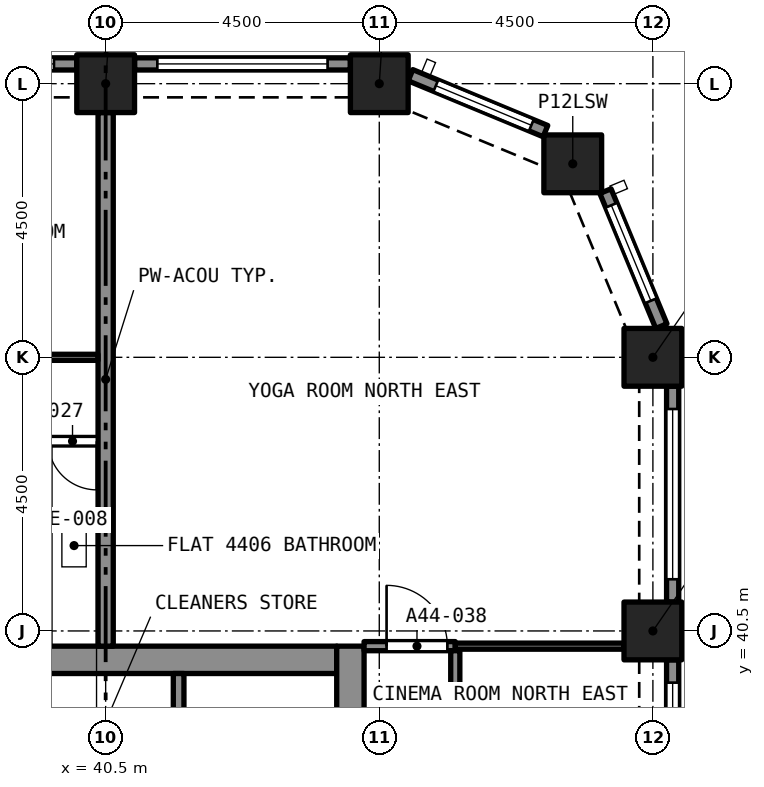
"""IFC4 building model, lengths in metres.
Left out: names, types, materials, properties, quantities, classifications, styles, units other than length and angle.
Written with IfcOpenShell. Run it as: python <this file> out.ifc"""

import sys

from ifc_helpers import new_model, si_unit, direction, frame, frame_2d, origin, origin_2d, place, context, subcontext, project, spatial, rectangle, extrude, element, fill, save


model = new_model("IFC4")
c1 = context("Model", 3, precision=1e-05, world=origin(), true_north=direction((0.0, 1.0)))
c2 = subcontext(c1, "Body", "Model", "MODEL_VIEW")
j1 = project(units=[si_unit("LENGTHUNIT", "METRE"), si_unit("PLANEANGLEUNIT", "RADIAN")], contexts=[c1])
p1 = place(None, origin())
s1 = spatial("IfcSite", under=j1, at=p1, CompositionType="ELEMENT")
p2 = place(p1, origin())
s2 = spatial("IfcBuilding", under=s1, at=p2, CompositionType="ELEMENT")
p3 = place(p2, frame((0.0, 0.0, 159.4)))
s3 = spatial("IfcBuildingStorey", under=s2, at=p3, CompositionType="ELEMENT", Elevation=159.4)
for number, where, z_axis, x_axis in (
    (1, (49.5, 40.5, 0.0), (0.0, 0.0, 1.0), (1.0, 0.0, 0.0)),
    (2, (49.5, 45.0, 0.0), (0.0, 0.0, 1.0), (1.0, 0.0, 0.0)),
    (3, (48.182, 48.182, 0.0), (0.0, 0.0, 1.0), (1.0, 0.0, 0.0)),
    (4, (40.5, 49.5, 0.0), (0.0, 0.0, 1.0), (1.0, 0.0, 0.0)),
    (5, (45.0, 49.5, 0.0), (0.0, 0.0, 1.0), (1.0, 0.0, 0.0)),
):
    element("IfcColumn", number, at=place(p3, frame(where, z_axis=z_axis, x_axis=x_axis)), inside=s3, PredefinedType="COLUMN", context=c2, shape_type="SweptSolid", body=[
        extrude(rectangle(XDim=0.95, YDim=0.95, at=origin_2d()), origin(), (0.0, 0.0, 1.0), 4.4),
    ])
p4 = place(p3, frame((36.7, 40.025, 0.0), z_axis=(0.0, 0.0, 1.0), x_axis=(1.0, 0.0, 0.0)))
e6 = element("IfcWall", 6, at=p4, inside=s3, PredefinedType="SOLIDWALL", context=c2, shape_type="SweptSolid", body=[
    extrude(rectangle(XDim=7.6, YDim=0.45, at=frame_2d((3.8, 0.0))), origin(), (0.0, 0.0, 1.0), 4.4),
])
p5 = place(p3, frame((44.525, 27.25, 0.0), z_axis=(0.0, 0.0, 1.0), x_axis=(0.0, 1.0, 0.0)))
e7 = element("IfcWall", 7, at=p5, inside=s3, PredefinedType="SOLIDWALL", context=c2, shape_type="SweptSolid", body=[
    extrude(rectangle(XDim=13.0, YDim=0.45, at=frame_2d((6.5, 0.0))), origin(), (0.0, 0.0, 1.0), 4.4),
])
p6 = place(p5, frame((8.7, 0.0, 0.0)))
e8 = element("IfcOpeningElement", 8, at=p6, cuts=e7, PredefinedType="OPENING", context=c2, shape_type="SweptSolid", body=[
    extrude(rectangle(XDim=1.2, YDim=2.1, at=frame_2d((0.6, 1.05))), frame((0.0, 0.235, 0.0), z_axis=(0.0, -1.0, 0.0), x_axis=(1.0, 0.0, 0.0)), (0.0, 0.0, 1.0), 0.47),
])
p7 = place(p3, frame((49.825, 40.025, 0.0), z_axis=(0.0, 0.0, 1.0), x_axis=(0.0, -1.0, 0.0)))
e9 = element("IfcWall", 9, at=p7, inside=s3, PredefinedType="SOLIDWALL", context=c2, shape_type="SweptSolid", body=[
    extrude(rectangle(XDim=3.55, YDim=0.2, at=frame_2d((1.775, 0.0))), origin(), (0.0, 0.0, 1.0), 4.4),
])
p8 = place(p7, frame((0.375, 0.0, 0.45)))
e10 = element("IfcOpeningElement", 10, at=p8, cuts=e9, PredefinedType="OPENING", context=c2, shape_type="SweptSolid", body=[
    extrude(rectangle(XDim=2.8, YDim=2.55, at=frame_2d((1.4, 1.275))), frame((0.0, 0.11, 0.0), z_axis=(0.0, -1.0, 0.0), x_axis=(1.0, 0.0, 0.0)), (0.0, 0.0, 1.0), 0.22),
])
p9 = place(p3, frame((49.825, 44.525, 0.0), z_axis=(0.0, 0.0, 1.0), x_axis=(0.0, -1.0, 0.0)))
e11 = element("IfcWall", 11, at=p9, inside=s3, PredefinedType="SOLIDWALL", context=c2, shape_type="SweptSolid", body=[
    extrude(rectangle(XDim=3.55, YDim=0.2, at=frame_2d((1.775, 0.0))), origin(), (0.0, 0.0, 1.0), 4.4),
])
p10 = place(p9, frame((0.375, 0.0, 0.45)))
e12 = element("IfcOpeningElement", 12, at=p10, cuts=e11, PredefinedType="OPENING", context=c2, shape_type="SweptSolid", body=[
    extrude(rectangle(XDim=2.8, YDim=2.55, at=frame_2d((1.4, 1.275))), frame((0.0, 0.11, 0.0), z_axis=(0.0, -1.0, 0.0), x_axis=(1.0, 0.0, 0.0)), (0.0, 0.0, 1.0), 0.22),
])
p11 = place(p3, frame((48.72, 47.733, 0.0), z_axis=(0.0, 0.0, 1.0), x_axis=(0.382680855588, -0.923880599843, 0.0)))
e13 = element("IfcWall", 13, at=p11, inside=s3, PredefinedType="SOLIDWALL", context=c2, shape_type="SweptSolid", body=[
    extrude(rectangle(XDim=2.403, YDim=0.2, at=frame_2d((1.201, 0.0))), origin(), (0.0, 0.0, 1.0), 4.4),
])
p12 = place(p11, frame((0.251, 0.0, 0.45)))
e14 = element("IfcOpeningElement", 14, at=p12, cuts=e13, PredefinedType="OPENING", context=c2, shape_type="SweptSolid", body=[
    extrude(rectangle(XDim=1.7, YDim=2.55, at=frame_2d((0.85, 1.275))), frame((0.0, 0.11, 0.0), z_axis=(0.0, -1.0, 0.0), x_axis=(1.0, 0.0, 0.0)), (0.0, 0.0, 1.0), 0.22),
])
p13 = place(p3, frame((45.513, 49.639, 0.0), z_axis=(0.0, 0.0, 1.0), x_axis=(0.923880599843, -0.382680855588, 0.0)))
e15 = element("IfcWall", 15, at=p13, inside=s3, PredefinedType="SOLIDWALL", context=c2, shape_type="SweptSolid", body=[
    extrude(rectangle(XDim=2.403, YDim=0.2, at=frame_2d((1.201, 0.0))), origin(), (0.0, 0.0, 1.0), 4.4),
])
p14 = place(p13, frame((0.451, 0.0, 0.45)))
e16 = element("IfcOpeningElement", 16, at=p14, cuts=e15, PredefinedType="OPENING", context=c2, shape_type="SweptSolid", body=[
    extrude(rectangle(XDim=1.7, YDim=2.55, at=frame_2d((0.85, 1.275))), frame((0.0, 0.11, 0.0), z_axis=(0.0, -1.0, 0.0), x_axis=(1.0, 0.0, 0.0)), (0.0, 0.0, 1.0), 0.22),
])
p15 = place(p3, frame((40.975, 49.825, 0.0), z_axis=(0.0, 0.0, 1.0), x_axis=(1.0, 0.0, 0.0)))
e17 = element("IfcWall", 17, at=p15, inside=s3, PredefinedType="SOLIDWALL", context=c2, shape_type="SweptSolid", body=[
    extrude(rectangle(XDim=3.55, YDim=0.2, at=frame_2d((1.775, 0.0))), origin(), (0.0, 0.0, 1.0), 4.4),
])
p16 = place(p15, frame((0.375, 0.0, 0.45)))
e18 = element("IfcOpeningElement", 18, at=p16, cuts=e17, PredefinedType="OPENING", context=c2, shape_type="SweptSolid", body=[
    extrude(rectangle(XDim=2.8, YDim=2.55, at=frame_2d((1.4, 1.275))), frame((0.0, 0.11, 0.0), z_axis=(0.0, -1.0, 0.0), x_axis=(1.0, 0.0, 0.0)), (0.0, 0.0, 1.0), 0.22),
])
p17 = place(p3, frame((36.475, 49.825, 0.0), z_axis=(0.0, 0.0, 1.0), x_axis=(1.0, 0.0, 0.0)))
e19 = element("IfcWall", 19, at=p17, inside=s3, PredefinedType="SOLIDWALL", context=c2, shape_type="SweptSolid", body=[
    extrude(rectangle(XDim=3.55, YDim=0.2, at=frame_2d((1.775, 0.0))), origin(), (0.0, 0.0, 1.0), 4.4),
])
p18 = place(p17, frame((0.375, 0.0, 0.45)))
e20 = element("IfcOpeningElement", 20, at=p18, cuts=e19, PredefinedType="OPENING", context=c2, shape_type="SweptSolid", body=[
    extrude(rectangle(XDim=2.8, YDim=2.55, at=frame_2d((1.4, 1.275))), frame((0.0, 0.11, 0.0), z_axis=(0.0, -1.0, 0.0), x_axis=(1.0, 0.0, 0.0)), (0.0, 0.0, 1.0), 0.22),
])
p19 = place(p3, frame((40.375, 43.62, 0.0), z_axis=(0.0, 0.0, 1.0), x_axis=(-1.0, 0.0, 0.0)))
e21 = element("IfcWall", 21, at=p19, inside=s3, PredefinedType="PARTITIONING", context=c2, shape_type="SweptSolid", body=[
    extrude(rectangle(XDim=0.852, YDim=0.125, at=frame_2d((0.426, 0.0))), origin(), (0.0, 0.0, 1.0), 4.1),
])
p20 = place(p19, frame((0.02, 0.0, 0.0)))
e22 = element("IfcOpeningElement", 22, at=p20, cuts=e21, PredefinedType="OPENING", context=c2, shape_type="SweptSolid", body=[
    extrude(rectangle(XDim=0.8, YDim=2.1, at=frame_2d((0.4, 1.05))), frame((0.0, 0.073, 0.0), z_axis=(0.0, -1.0, 0.0), x_axis=(1.0, 0.0, 0.0)), (0.0, 0.0, 1.0), 0.145),
])
p21 = place(p3, frame((40.5, 40.25, 0.0), z_axis=(0.0, 0.0, 1.0), x_axis=(0.0, 1.0, 0.0)))
e23 = element("IfcWall", 23, at=p21, inside=s3, PredefinedType="PARTITIONING", context=c2, shape_type="SweptSolid", body=[
    extrude(rectangle(XDim=8.775, YDim=0.25, at=frame_2d((4.387, 0.0))), origin(), (0.0, 0.0, 1.0), 4.1),
])
p22 = place(p3, frame((36.0, 45.0, 0.0), z_axis=(0.0, 0.0, 1.0), x_axis=(1.0, 0.0, 0.0)))
e24 = element("IfcWall", 24, at=p22, inside=s3, PredefinedType="PARTITIONING", context=c2, shape_type="SweptSolid", body=[
    extrude(rectangle(XDim=4.375, YDim=0.1, at=frame_2d((2.188, 0.0))), origin(), (0.0, 0.0, 1.0), 4.1),
])
p23 = place(p22, frame((1.8, 0.0, 0.0)))
e25 = element("IfcOpeningElement", 25, at=p23, cuts=e24, PredefinedType="OPENING", context=c2, shape_type="SweptSolid", body=[
    extrude(rectangle(XDim=0.9, YDim=2.1, at=frame_2d((0.45, 1.05))), frame((0.0, 0.06, 0.0), z_axis=(0.0, -1.0, 0.0), x_axis=(1.0, 0.0, 0.0)), (0.0, 0.0, 1.0), 0.12),
])
p24 = place(p3, frame((44.75, 40.25, 0.0), z_axis=(0.0, 0.0, 1.0), x_axis=(1.0, 0.0, 0.0)))
e26 = element("IfcWall", 26, at=p24, inside=s3, PredefinedType="PARTITIONING", context=c2, shape_type="SweptSolid", body=[
    extrude(rectangle(XDim=1.5, YDim=0.15, at=frame_2d((0.75, 0.0))), origin(), (0.0, 0.0, 1.0), 4.1),
])
p25 = place(p24, frame((0.37, 0.0, 0.0)))
e27 = element("IfcOpeningElement", 27, at=p25, cuts=e26, PredefinedType="OPENING", context=c2, shape_type="SweptSolid", body=[
    extrude(rectangle(XDim=1.0, YDim=2.1, at=frame_2d((0.5, 1.05))), frame((0.0, 0.085, 0.0), z_axis=(0.0, -1.0, 0.0), x_axis=(1.0, 0.0, 0.0)), (0.0, 0.0, 1.0), 0.17),
])
p26 = place(p3, frame((46.25, 40.25, 0.0), z_axis=(0.0, 0.0, 1.0), x_axis=(1.0, 0.0, 0.0)))
e28 = element("IfcWall", 28, at=p26, inside=s3, PredefinedType="PARTITIONING", context=c2, shape_type="SweptSolid", body=[
    extrude(rectangle(XDim=2.775, YDim=0.1, at=frame_2d((1.387, 0.0))), origin(), (0.0, 0.0, 1.0), 4.1),
])
p27 = place(p3, frame((46.25, 40.175, 0.0), z_axis=(0.0, 0.0, 1.0), x_axis=(0.0, -1.0, 0.0)))
e29 = element("IfcWall", 29, at=p27, inside=s3, PredefinedType="PARTITIONING", context=c2, shape_type="SweptSolid", body=[
    extrude(rectangle(XDim=4.175, YDim=0.15, at=frame_2d((2.087, 0.0))), origin(), (0.0, 0.0, 1.0), 4.1),
])
p28 = place(p27, frame((1.55, 0.0, 0.0)))
e30 = element("IfcOpeningElement", 30, at=p28, cuts=e29, PredefinedType="OPENING", context=c2, shape_type="SweptSolid", body=[
    extrude(rectangle(XDim=1.0, YDim=2.1, at=frame_2d((0.5, 1.05))), frame((0.0, 0.085, 0.0), z_axis=(0.0, -1.0, 0.0), x_axis=(1.0, 0.0, 0.0)), (0.0, 0.0, 1.0), 0.17),
])
p29 = place(p3, frame((41.7, 37.5, 0.0), z_axis=(0.0, 0.0, 1.0), x_axis=(0.0, 1.0, 0.0)))
e31 = element("IfcWall", 31, at=p29, inside=s3, PredefinedType="SOLIDWALL", context=c2, shape_type="SweptSolid", body=[
    extrude(rectangle(XDim=2.3, YDim=0.175, at=frame_2d((1.15, 0.0))), origin(), (0.0, 0.0, 1.0), 4.1),
])
p30 = place(p8, origin())
e32 = element("IfcWindow", 32, at=p30, inside=s3, PartitioningType="SINGLE_PANEL", PredefinedType="WINDOW", context=c2, shape_type="SweptSolid", body=[
    extrude(rectangle(XDim=2.8, YDim=2.55, at=frame_2d((1.4, 1.275))), frame((0.0, 0.03, 0.0), z_axis=(0.0, -1.0, 0.0), x_axis=(1.0, 0.0, 0.0)), (0.0, 0.0, 1.0), 0.06),
])
fill(e10, e32)
p31 = place(p10, origin())
e33 = element("IfcWindow", 33, at=p31, inside=s3, PartitioningType="SINGLE_PANEL", PredefinedType="WINDOW", context=c2, shape_type="SweptSolid", body=[
    extrude(rectangle(XDim=2.8, YDim=2.55, at=frame_2d((1.4, 1.275))), frame((0.0, 0.03, 0.0), z_axis=(0.0, -1.0, 0.0), x_axis=(1.0, 0.0, 0.0)), (0.0, 0.0, 1.0), 0.06),
])
fill(e12, e33)
p32 = place(p12, origin())
e34 = element("IfcWindow", 34, at=p32, inside=s3, PartitioningType="SINGLE_PANEL", PredefinedType="WINDOW", context=c2, shape_type="SweptSolid", body=[
    extrude(rectangle(XDim=1.7, YDim=2.55, at=frame_2d((0.85, 1.275))), frame((0.0, 0.03, 0.0), z_axis=(0.0, -1.0, 0.0), x_axis=(1.0, 0.0, 0.0)), (0.0, 0.0, 1.0), 0.06),
])
fill(e14, e34)
p33 = place(p14, origin())
e35 = element("IfcWindow", 35, at=p33, inside=s3, PartitioningType="SINGLE_PANEL", PredefinedType="WINDOW", context=c2, shape_type="SweptSolid", body=[
    extrude(rectangle(XDim=1.7, YDim=2.55, at=frame_2d((0.85, 1.275))), frame((0.0, 0.03, 0.0), z_axis=(0.0, -1.0, 0.0), x_axis=(1.0, 0.0, 0.0)), (0.0, 0.0, 1.0), 0.06),
])
fill(e16, e35)
p34 = place(p16, origin())
e36 = element("IfcWindow", 36, at=p34, inside=s3, PartitioningType="SINGLE_PANEL", PredefinedType="WINDOW", context=c2, shape_type="SweptSolid", body=[
    extrude(rectangle(XDim=2.8, YDim=2.55, at=frame_2d((1.4, 1.275))), frame((0.0, 0.03, 0.0), z_axis=(0.0, -1.0, 0.0), x_axis=(1.0, 0.0, 0.0)), (0.0, 0.0, 1.0), 0.06),
])
fill(e18, e36)
p35 = place(p18, origin())
e37 = element("IfcWindow", 37, at=p35, inside=s3, PartitioningType="SINGLE_PANEL", PredefinedType="WINDOW", context=c2, shape_type="SweptSolid", body=[
    extrude(rectangle(XDim=2.8, YDim=2.55, at=frame_2d((1.4, 1.275))), frame((0.0, 0.03, 0.0), z_axis=(0.0, -1.0, 0.0), x_axis=(1.0, 0.0, 0.0)), (0.0, 0.0, 1.0), 0.06),
])
fill(e20, e37)
p36 = place(p20, origin())
e38 = element("IfcDoor", 38, at=p36, inside=s3, OperationType="SINGLE_SWING_LEFT", PredefinedType="DOOR", context=c2, shape_type="SweptSolid", body=[
    extrude(rectangle(XDim=0.8, YDim=2.1, at=frame_2d((0.4, 1.05))), frame((0.0, 0.025, 0.0), z_axis=(0.0, -1.0, 0.0), x_axis=(1.0, 0.0, 0.0)), (0.0, 0.0, 1.0), 0.05),
])
fill(e22, e38)
p37 = place(p25, origin())
e39 = element("IfcDoor", 39, at=p37, inside=s3, OperationType="SINGLE_SWING_RIGHT", PredefinedType="DOOR", context=c2, shape_type="SweptSolid", body=[
    extrude(rectangle(XDim=1.0, YDim=2.1, at=frame_2d((0.5, 1.05))), frame((0.0, 0.025, 0.0), z_axis=(0.0, -1.0, 0.0), x_axis=(1.0, 0.0, 0.0)), (0.0, 0.0, 1.0), 0.05),
])
fill(e27, e39)
save(model, sys.argv[1])
